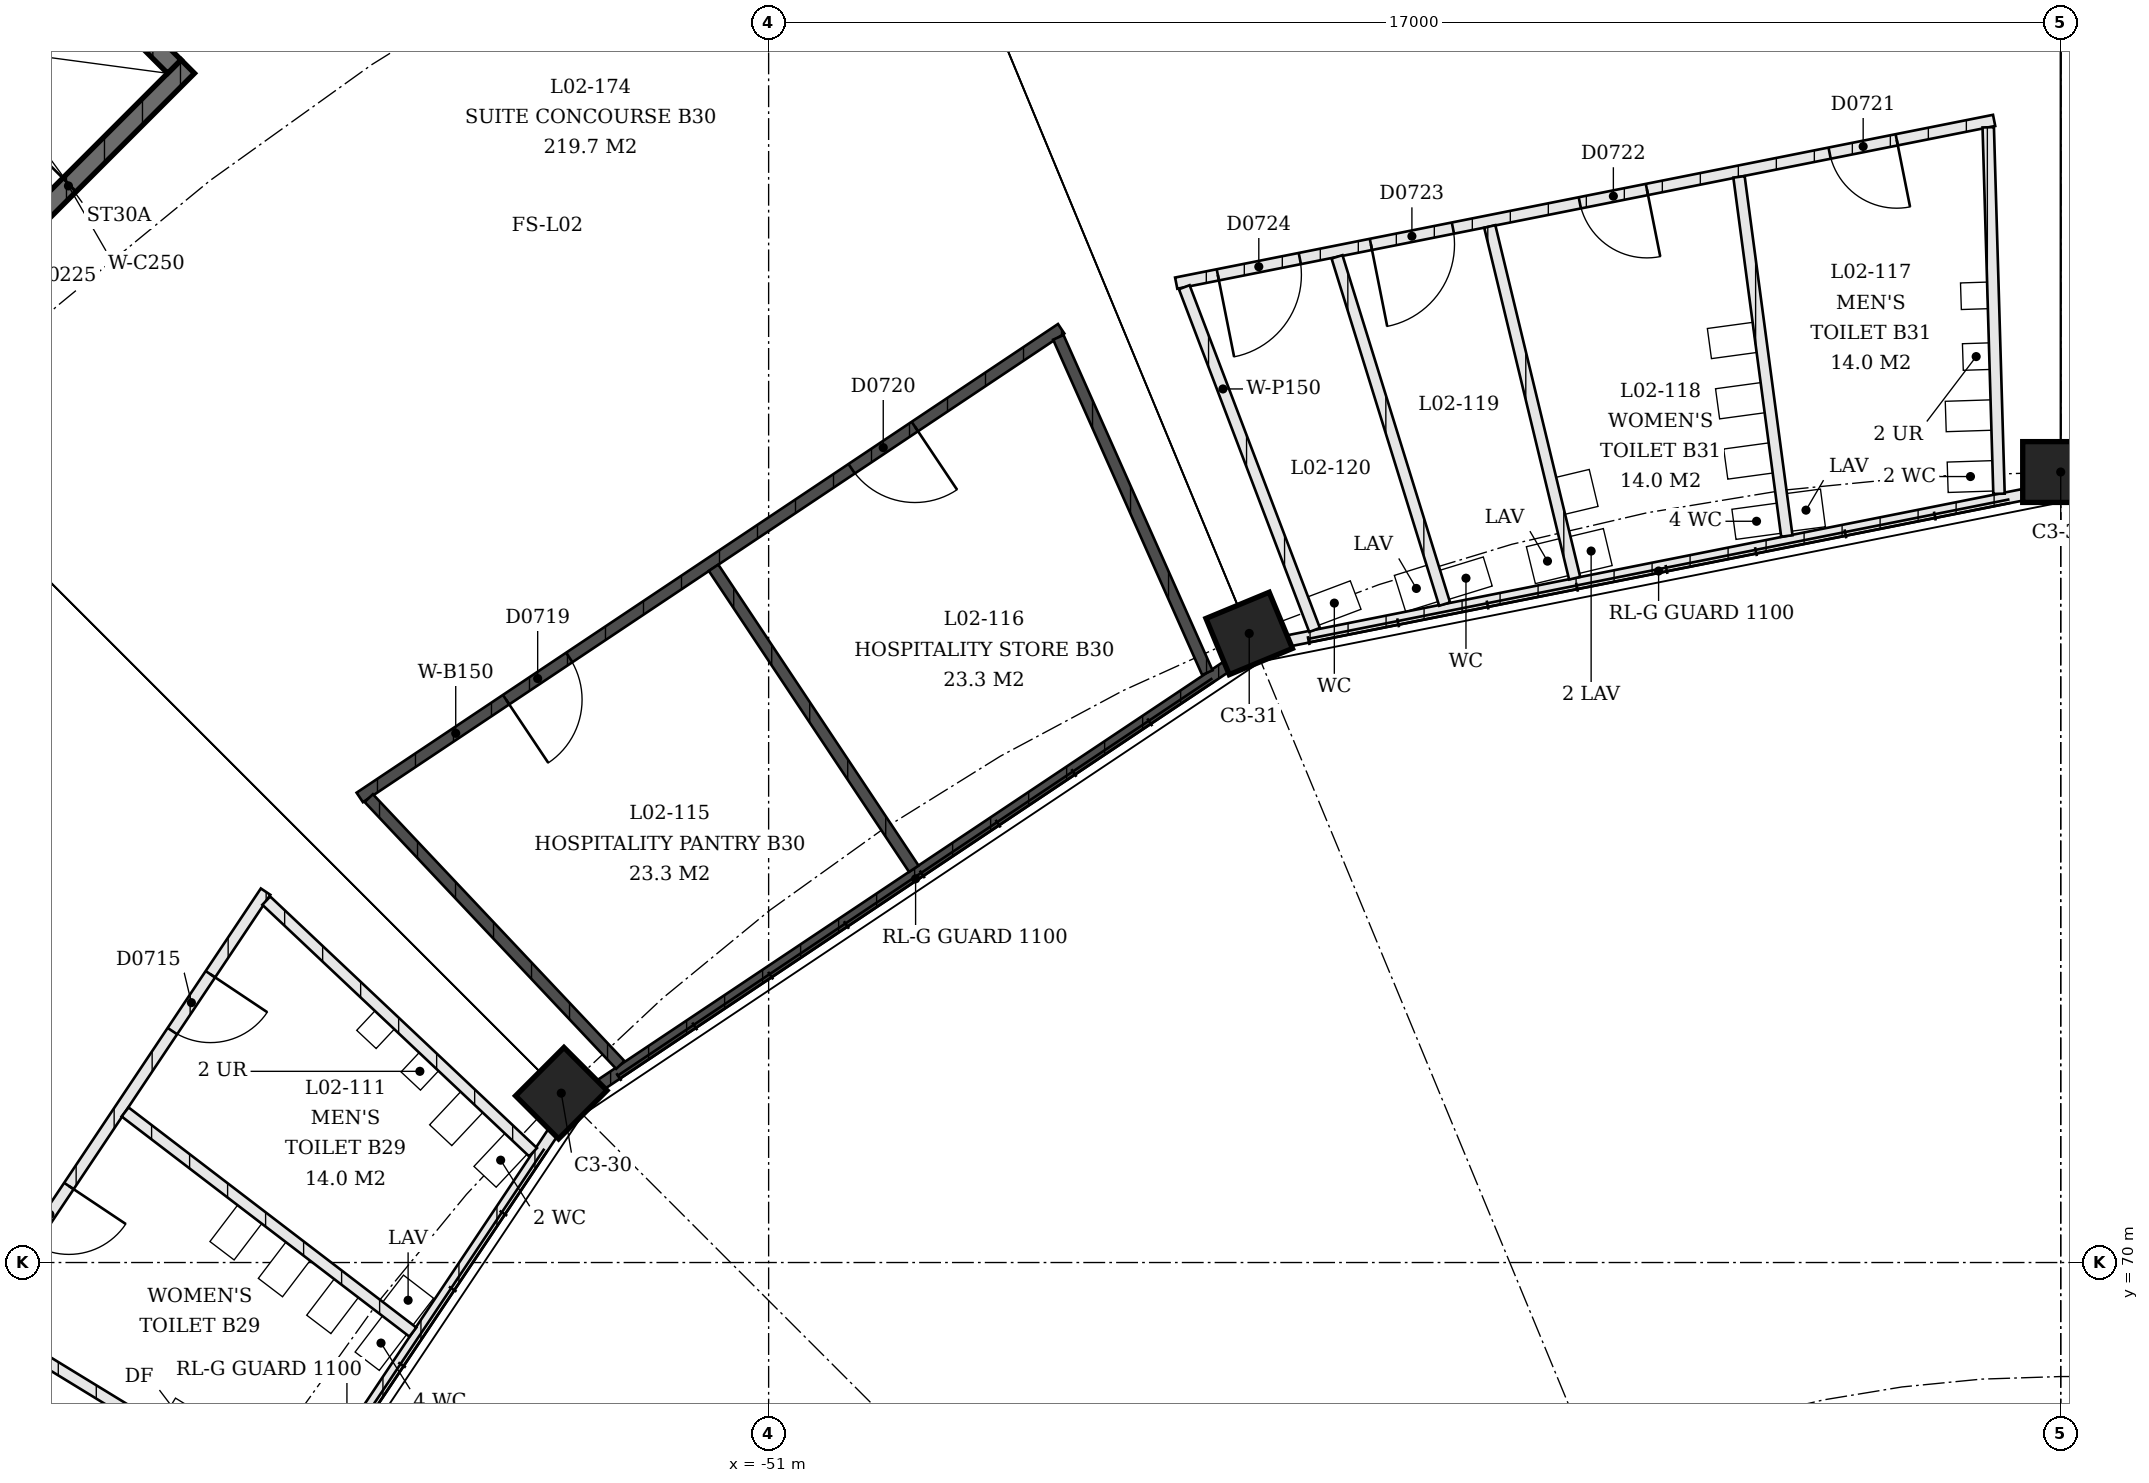
"""IFC4 building model, lengths in metres.
Left out: names, types, materials, properties, quantities, classifications, styles, units other than length and angle.
Written with IfcOpenShell. Run it as: python <this file> out.ifc"""

import sys

from ifc_helpers import new_model, si_unit, direction, frame, frame_2d, origin, origin_2d, place, context, subcontext, project, spatial, rectangle, extrude, element, fill, save


model = new_model("IFC4")
c1 = context("Model", 3, precision=1e-05, world=origin(), true_north=direction((0.0, 1.0)))
c2 = subcontext(c1, "Body", "Model", "MODEL_VIEW")
j1 = project(units=[si_unit("LENGTHUNIT", "METRE"), si_unit("PLANEANGLEUNIT", "RADIAN")], contexts=[c1])
p1 = place(None, origin())
s1 = spatial("IfcSite", under=j1, at=p1, CompositionType="ELEMENT")
p2 = place(p1, origin())
s2 = spatial("IfcBuilding", under=s1, at=p2, CompositionType="ELEMENT")
p3 = place(p2, frame((0.0, 0.0, 9.0)))
s3 = spatial("IfcBuildingStorey", under=s2, at=p3, CompositionType="ELEMENT", Elevation=9.0)
for number, where, z_axis, x_axis in (
    (1, (-53.728, 72.228, 0.0), (0.0, 0.0, 1.0), (-0.707, -0.707, 0.0)),
    (2, (-44.677, 78.276, 0.0), (0.0, 0.0, 1.0), (-0.924, -0.383, 0.0)),
):
    element("IfcColumn", number, at=place(p3, frame(where, z_axis=z_axis, x_axis=x_axis)), inside=s3, PredefinedType="COLUMN", context=c2, shape_type="SweptSolid", body=[
        extrude(rectangle(XDim=0.9, YDim=0.8, at=origin_2d()), origin(), (0.0, 0.0, 1.0), 4.5),
    ])
p4 = place(p3, frame((-34.0, 80.4, 0.0), z_axis=(0.0, 0.0, 1.0), x_axis=(-1.0, 0.0, 0.0)))
e3 = element("IfcColumn", 3, at=p4, inside=s3, PredefinedType="COLUMN", context=c2, shape_type="SweptSolid", body=[
    extrude(rectangle(XDim=1.0, YDim=0.8, at=origin_2d()), origin(), (0.0, 0.0, 1.0), 4.5),
])
p5 = place(p3, frame((-58.643, 85.734, 0.0), z_axis=(0.0, 0.0, 1.0), x_axis=(-0.707106781187, -0.707106781187, 0.0)))
e4 = element("IfcWall", 4, at=p5, inside=s3, PredefinedType="SHEAR", context=c2, shape_type="SweptSolid", body=[
    extrude(rectangle(XDim=12.15, YDim=0.25, at=frame_2d((6.075, 0.0))), origin(), (0.0, 0.0, 1.0), 4.09),
])
p6 = place(p5, frame((2.2, 0.0, 0.0)))
e5 = element("IfcOpeningElement", 5, at=p6, cuts=e4, PredefinedType="OPENING", context=c2, shape_type="SweptSolid", body=[
    extrude(rectangle(XDim=1.8, YDim=2.1, at=frame_2d((0.9, 1.05))), frame((0.0, 0.125, 0.0), z_axis=(0.0, -1.0, 0.0), x_axis=(1.0, 0.0, 0.0)), (0.0, 0.0, 1.0), 0.25),
])
p7 = place(p5, frame((8.15, 0.0, 0.0)))
e6 = element("IfcOpeningElement", 6, at=p7, cuts=e4, PredefinedType="OPENING", context=c2, shape_type="SweptSolid", body=[
    extrude(rectangle(XDim=1.8, YDim=2.1, at=frame_2d((0.9, 1.05))), frame((0.0, 0.125, 0.0), z_axis=(0.0, -1.0, 0.0), x_axis=(1.0, 0.0, 0.0)), (0.0, 0.0, 1.0), 0.25),
])
p8 = place(p3, frame((-58.819, 85.734, 0.0), z_axis=(0.0, 0.0, 1.0), x_axis=(-0.707123144286, 0.707090417709, 0.0)))
e7 = element("IfcWall", 7, at=p8, inside=s3, PredefinedType="SHEAR", context=c2, shape_type="SweptSolid", body=[
    extrude(rectangle(XDim=7.46, YDim=0.25, at=frame_2d((3.73, 0.0))), origin(), (0.0, 0.0, 1.0), 4.09),
])
p9 = place(p3, frame((-53.842, 71.705, 0.0), z_axis=(0.0, 0.0, 1.0), x_axis=(-0.555582843463, -0.831461186136, 0.0)))
e8 = element("IfcWall", 8, at=p9, inside=s3, PredefinedType="PARTITIONING", context=c2, shape_type="SweptSolid", body=[
    extrude(rectangle(XDim=9.89, YDim=0.15, at=frame_2d((4.945, 0.0))), origin(), (0.0, 0.0, 1.0), 3.0),
])
p10 = place(p3, frame((-57.619, 74.88, 0.0), z_axis=(0.0, 0.0, 1.0), x_axis=(-0.555577934543, -0.831464466258, 0.0)))
e9 = element("IfcWall", 9, at=p10, inside=s3, PredefinedType="PARTITIONING", context=c2, shape_type="SweptSolid", body=[
    extrude(rectangle(XDim=10.972, YDim=0.15, at=frame_2d((5.486, 0.0))), origin(), (0.0, 0.0, 1.0), 3.0),
])
p11 = place(p10, frame((1.307, 0.0, 0.0)))
e10 = element("IfcOpeningElement", 10, at=p11, cuts=e9, PredefinedType="OPENING", context=c2, shape_type="SweptSolid", body=[
    extrude(rectangle(XDim=0.9, YDim=2.1, at=frame_2d((0.45, 1.05))), frame((0.0, 0.075, 0.0), z_axis=(0.0, -1.0, 0.0), x_axis=(1.0, 0.0, 0.0)), (0.0, 0.0, 1.0), 0.15),
])
p12 = place(p10, frame((4.658, 0.0, 0.0)))
e11 = element("IfcOpeningElement", 11, at=p12, cuts=e9, PredefinedType="OPENING", context=c2, shape_type="SweptSolid", body=[
    extrude(rectangle(XDim=0.9, YDim=2.1, at=frame_2d((0.45, 1.05))), frame((0.0, 0.075, 0.0), z_axis=(0.0, -1.0, 0.0), x_axis=(1.0, 0.0, 0.0)), (0.0, 0.0, 1.0), 0.15),
])
p13 = place(p10, frame((7.26, 0.0, 0.0)))
e12 = element("IfcOpeningElement", 12, at=p13, cuts=e9, PredefinedType="OPENING", context=c2, shape_type="SweptSolid", body=[
    extrude(rectangle(XDim=1.1, YDim=2.1, at=frame_2d((0.55, 1.05))), frame((0.0, 0.075, 0.0), z_axis=(0.0, -1.0, 0.0), x_axis=(1.0, 0.0, 0.0)), (0.0, 0.0, 1.0), 0.15),
])
p14 = place(p10, frame((9.314, 0.0, 0.0)))
e13 = element("IfcOpeningElement", 13, at=p14, cuts=e9, PredefinedType="OPENING", context=c2, shape_type="SweptSolid", body=[
    extrude(rectangle(XDim=1.1, YDim=2.1, at=frame_2d((0.55, 1.05))), frame((0.0, 0.075, 0.0), z_axis=(0.0, -1.0, 0.0), x_axis=(1.0, 0.0, 0.0)), (0.0, 0.0, 1.0), 0.15),
])
p15 = place(p3, frame((-54.1, 71.452, 0.0), z_axis=(0.0, 0.0, 1.0), x_axis=(-0.727577136184, 0.686025882093, 0.0)))
e14 = element("IfcWall", 14, at=p15, inside=s3, PredefinedType="PARTITIONING", context=c2, shape_type="SweptSolid", body=[
    extrude(rectangle(XDim=4.824, YDim=0.15, at=frame_2d((2.412, 0.0))), origin(), (0.0, 0.0, 1.0), 3.0),
])
p16 = place(p3, frame((-55.681, 69.085, 0.0), z_axis=(0.0, 0.0, 1.0), x_axis=(-0.794266232117, 0.607569874597, 0.0)))
e15 = element("IfcWall", 15, at=p16, inside=s3, PredefinedType="PARTITIONING", context=c2, shape_type="SweptSolid", body=[
    extrude(rectangle(XDim=4.767, YDim=0.15, at=frame_2d((2.383, 0.0))), origin(), (0.0, 0.0, 1.0), 3.0),
])
p17 = place(p3, frame((-57.262, 66.718, 0.0), z_axis=(0.0, 0.0, 1.0), x_axis=(-0.8532285882, 0.52153712838, 0.0)))
e16 = element("IfcWall", 16, at=p17, inside=s3, PredefinedType="PARTITIONING", context=c2, shape_type="SweptSolid", body=[
    extrude(rectangle(XDim=4.761, YDim=0.15, at=frame_2d((2.38, 0.0))), origin(), (0.0, 0.0, 1.0), 3.0),
])
p18 = place(p3, frame((-53.205, 72.342, 0.0), z_axis=(0.0, 0.0, 1.0), x_axis=(0.831461186136, 0.555582843463, 0.0)))
e17 = element("IfcWall", 17, at=p18, inside=s3, PredefinedType="SOLIDWALL", context=c2, shape_type="SweptSolid", body=[
    extrude(rectangle(XDim=9.89, YDim=0.15, at=frame_2d((4.945, 0.0))), origin(), (0.0, 0.0, 1.0), 3.0),
])
p19 = place(p3, frame((-56.38, 76.119, 0.0), z_axis=(0.0, 0.0, 1.0), x_axis=(0.831471162003, 0.555567913722, 0.0)))
e18 = element("IfcWall", 18, at=p19, inside=s3, PredefinedType="SOLIDWALL", context=c2, shape_type="SweptSolid", body=[
    extrude(rectangle(XDim=11.099, YDim=0.15, at=frame_2d((5.55, 0.0))), origin(), (0.0, 0.0, 1.0), 3.0),
])
p20 = place(p19, frame((2.315, 0.0, 0.0)))
e19 = element("IfcOpeningElement", 19, at=p20, cuts=e18, PredefinedType="OPENING", context=c2, shape_type="SweptSolid", body=[
    extrude(rectangle(XDim=1.0, YDim=2.1, at=frame_2d((0.5, 1.05))), frame((0.0, 0.075, 0.0), z_axis=(0.0, -1.0, 0.0), x_axis=(1.0, 0.0, 0.0)), (0.0, 0.0, 1.0), 0.15),
])
p21 = place(p19, frame((7.784, 0.0, 0.0)))
e20 = element("IfcOpeningElement", 20, at=p21, cuts=e18, PredefinedType="OPENING", context=c2, shape_type="SweptSolid", body=[
    extrude(rectangle(XDim=1.0, YDim=2.1, at=frame_2d((0.5, 1.05))), frame((0.0, 0.075, 0.0), z_axis=(0.0, -1.0, 0.0), x_axis=(1.0, 0.0, 0.0)), (0.0, 0.0, 1.0), 0.15),
])
p22 = place(p3, frame((-52.952, 72.6, 0.0), z_axis=(0.0, 0.0, 1.0), x_axis=(-0.686025882093, 0.727577136184, 0.0)))
e21 = element("IfcWall", 21, at=p22, inside=s3, PredefinedType="SOLIDWALL", context=c2, shape_type="SweptSolid", body=[
    extrude(rectangle(XDim=4.824, YDim=0.15, at=frame_2d((2.412, 0.0))), origin(), (0.0, 0.0, 1.0), 3.0),
])
p23 = place(p3, frame((-49.09, 75.18, 0.0), z_axis=(0.0, 0.0, 1.0), x_axis=(-0.553930112441, 0.832563169093, 0.0)))
e22 = element("IfcWall", 22, at=p23, inside=s3, PredefinedType="SOLIDWALL", context=c2, shape_type="SweptSolid", body=[
    extrude(rectangle(XDim=4.757, YDim=0.15, at=frame_2d((2.378, 0.0))), origin(), (0.0, 0.0, 1.0), 3.0),
])
p24 = place(p3, frame((-45.228, 77.761, 0.0), z_axis=(0.0, 0.0, 1.0), x_axis=(-0.406147851791, 0.913807377124, 0.0)))
e23 = element("IfcWall", 23, at=p24, inside=s3, PredefinedType="SOLIDWALL", context=c2, shape_type="SweptSolid", body=[
    extrude(rectangle(XDim=4.827, YDim=0.15, at=frame_2d((2.414, 0.0))), origin(), (0.0, 0.0, 1.0), 3.0),
])
p25 = place(p3, frame((-34.5, 80.101, 0.0), z_axis=(0.0, 0.0, 1.0), x_axis=(-0.980783419557, -0.195099676887, 0.0)))
e24 = element("IfcWall", 24, at=p25, inside=s3, PredefinedType="PARTITIONING", context=c2, shape_type="SweptSolid", body=[
    extrude(rectangle(XDim=9.839, YDim=0.15, at=frame_2d((4.92, 0.0))), origin(), (0.0, 0.0, 1.0), 3.0),
])
p26 = place(p3, frame((-34.876, 85.026, 0.0), z_axis=(0.0, 0.0, 1.0), x_axis=(-0.980788934186, -0.195071952313, 0.0)))
e25 = element("IfcWall", 25, at=p26, inside=s3, PredefinedType="PARTITIONING", context=c2, shape_type="SweptSolid", body=[
    extrude(rectangle(XDim=10.972, YDim=0.15, at=frame_2d((5.486, 0.0))), origin(), (0.0, 0.0, 1.0), 3.0),
])
p27 = place(p26, frame((1.307, 0.0, 0.0)))
e26 = element("IfcOpeningElement", 26, at=p27, cuts=e25, PredefinedType="OPENING", context=c2, shape_type="SweptSolid", body=[
    extrude(rectangle(XDim=0.9, YDim=2.1, at=frame_2d((0.45, 1.05))), frame((0.0, 0.075, 0.0), z_axis=(0.0, -1.0, 0.0), x_axis=(1.0, 0.0, 0.0)), (0.0, 0.0, 1.0), 0.15),
])
p28 = place(p26, frame((4.658, 0.0, 0.0)))
e27 = element("IfcOpeningElement", 27, at=p28, cuts=e25, PredefinedType="OPENING", context=c2, shape_type="SweptSolid", body=[
    extrude(rectangle(XDim=0.9, YDim=2.1, at=frame_2d((0.45, 1.05))), frame((0.0, 0.075, 0.0), z_axis=(0.0, -1.0, 0.0), x_axis=(1.0, 0.0, 0.0)), (0.0, 0.0, 1.0), 0.15),
])
p29 = place(p26, frame((7.26, 0.0, 0.0)))
e28 = element("IfcOpeningElement", 28, at=p29, cuts=e25, PredefinedType="OPENING", context=c2, shape_type="SweptSolid", body=[
    extrude(rectangle(XDim=1.1, YDim=2.1, at=frame_2d((0.55, 1.05))), frame((0.0, 0.075, 0.0), z_axis=(0.0, -1.0, 0.0), x_axis=(1.0, 0.0, 0.0)), (0.0, 0.0, 1.0), 0.15),
])
p30 = place(p26, frame((9.314, 0.0, 0.0)))
e29 = element("IfcOpeningElement", 29, at=p30, cuts=e25, PredefinedType="OPENING", context=c2, shape_type="SweptSolid", body=[
    extrude(rectangle(XDim=1.1, YDim=2.1, at=frame_2d((0.55, 1.05))), frame((0.0, 0.075, 0.0), z_axis=(0.0, -1.0, 0.0), x_axis=(1.0, 0.0, 0.0)), (0.0, 0.0, 1.0), 0.15),
])
p31 = place(p3, frame((-34.812, 80.114, 0.0), z_axis=(0.0, 0.0, 1.0), x_axis=(-0.029405000692, 0.999567579473, 0.0)))
e30 = element("IfcWall", 30, at=p31, inside=s3, PredefinedType="PARTITIONING", context=c2, shape_type="SweptSolid", body=[
    extrude(rectangle(XDim=4.824, YDim=0.15, at=frame_2d((2.412, 0.0))), origin(), (0.0, 0.0, 1.0), 3.0),
])
p32 = place(p3, frame((-37.604, 79.558, 0.0), z_axis=(0.0, 0.0, 1.0), x_axis=(-0.131992613728, 0.991250699834, 0.0)))
e31 = element("IfcWall", 31, at=p32, inside=s3, PredefinedType="PARTITIONING", context=c2, shape_type="SweptSolid", body=[
    extrude(rectangle(XDim=4.767, YDim=0.15, at=frame_2d((2.383, 0.0))), origin(), (0.0, 0.0, 1.0), 3.0),
])
p33 = place(p3, frame((-40.395, 79.003, 0.0), z_axis=(0.0, 0.0, 1.0), x_axis=(-0.234563667056, 0.972100759231, 0.0)))
e32 = element("IfcWall", 32, at=p33, inside=s3, PredefinedType="PARTITIONING", context=c2, shape_type="SweptSolid", body=[
    extrude(rectangle(XDim=4.761, YDim=0.15, at=frame_2d((2.38, 0.0))), origin(), (0.0, 0.0, 1.0), 3.0),
])
p34 = place(p3, frame((-42.106, 78.663, 0.0), z_axis=(0.0, 0.0, 1.0), x_axis=(-0.295972093403, 0.955196587058, 0.0)))
e33 = element("IfcWall", 33, at=p34, inside=s3, PredefinedType="PARTITIONING", context=c2, shape_type="SweptSolid", body=[
    extrude(rectangle(XDim=4.783, YDim=0.15, at=frame_2d((2.391, 0.0))), origin(), (0.0, 0.0, 1.0), 3.0),
])
p35 = place(p3, frame((-43.817, 78.322, 0.0), z_axis=(0.0, 0.0, 1.0), x_axis=(-0.35538492255, 0.934720041951, 0.0)))
e34 = element("IfcWall", 34, at=p35, inside=s3, PredefinedType="PARTITIONING", context=c2, shape_type="SweptSolid", body=[
    extrude(rectangle(XDim=4.824, YDim=0.15, at=frame_2d((2.412, 0.0))), origin(), (0.0, 0.0, 1.0), 3.0),
])
p36 = place(p6, origin())
e35 = element("IfcDoor", 35, at=p36, inside=s3, OperationType="DOUBLE_DOOR_SINGLE_SWING", PredefinedType="DOOR", context=c2, shape_type="SweptSolid", body=[
    extrude(rectangle(XDim=1.8, YDim=2.1, at=frame_2d((0.9, 1.05))), frame((0.0, 0.025, 0.0), z_axis=(0.0, -1.0, 0.0), x_axis=(1.0, 0.0, 0.0)), (0.0, 0.0, 1.0), 0.05),
])
fill(e5, e35)
p37 = place(p11, origin())
e36 = element("IfcDoor", 36, at=p37, inside=s3, OperationType="SINGLE_SWING_RIGHT", PredefinedType="DOOR", context=c2, shape_type="SweptSolid", body=[
    extrude(rectangle(XDim=0.9, YDim=2.1, at=frame_2d((0.45, 1.05))), frame((0.0, 0.025, 0.0), z_axis=(0.0, -1.0, 0.0), x_axis=(1.0, 0.0, 0.0)), (0.0, 0.0, 1.0), 0.05),
])
fill(e10, e36)
p38 = place(p12, origin())
e37 = element("IfcDoor", 37, at=p38, inside=s3, OperationType="SINGLE_SWING_RIGHT", PredefinedType="DOOR", context=c2, shape_type="SweptSolid", body=[
    extrude(rectangle(XDim=0.9, YDim=2.1, at=frame_2d((0.45, 1.05))), frame((0.0, 0.025, 0.0), z_axis=(0.0, -1.0, 0.0), x_axis=(1.0, 0.0, 0.0)), (0.0, 0.0, 1.0), 0.05),
])
fill(e11, e37)
p39 = place(p20, origin())
e38 = element("IfcDoor", 38, at=p39, inside=s3, OperationType="SINGLE_SWING_LEFT", PredefinedType="DOOR", context=c2, shape_type="SweptSolid", body=[
    extrude(rectangle(XDim=1.0, YDim=2.1, at=frame_2d((0.5, 1.05))), frame((0.0, 0.025, 0.0), z_axis=(0.0, -1.0, 0.0), x_axis=(1.0, 0.0, 0.0)), (0.0, 0.0, 1.0), 0.05),
])
fill(e19, e38)
p40 = place(p21, origin())
e39 = element("IfcDoor", 39, at=p40, inside=s3, OperationType="SINGLE_SWING_RIGHT", PredefinedType="DOOR", context=c2, shape_type="SweptSolid", body=[
    extrude(rectangle(XDim=1.0, YDim=2.1, at=frame_2d((0.5, 1.05))), frame((0.0, 0.025, 0.0), z_axis=(0.0, -1.0, 0.0), x_axis=(1.0, 0.0, 0.0)), (0.0, 0.0, 1.0), 0.05),
])
fill(e20, e39)
p41 = place(p27, origin())
e40 = element("IfcDoor", 40, at=p41, inside=s3, OperationType="SINGLE_SWING_RIGHT", PredefinedType="DOOR", context=c2, shape_type="SweptSolid", body=[
    extrude(rectangle(XDim=0.9, YDim=2.1, at=frame_2d((0.45, 1.05))), frame((0.0, 0.025, 0.0), z_axis=(0.0, -1.0, 0.0), x_axis=(1.0, 0.0, 0.0)), (0.0, 0.0, 1.0), 0.05),
])
fill(e26, e40)
p42 = place(p28, origin())
e41 = element("IfcDoor", 41, at=p42, inside=s3, OperationType="SINGLE_SWING_RIGHT", PredefinedType="DOOR", context=c2, shape_type="SweptSolid", body=[
    extrude(rectangle(XDim=0.9, YDim=2.1, at=frame_2d((0.45, 1.05))), frame((0.0, 0.025, 0.0), z_axis=(0.0, -1.0, 0.0), x_axis=(1.0, 0.0, 0.0)), (0.0, 0.0, 1.0), 0.05),
])
fill(e27, e41)
p43 = place(p29, origin())
e42 = element("IfcDoor", 42, at=p43, inside=s3, OperationType="SINGLE_SWING_LEFT", PredefinedType="DOOR", context=c2, shape_type="SweptSolid", body=[
    extrude(rectangle(XDim=1.1, YDim=2.1, at=frame_2d((0.55, 1.05))), frame((0.0, 0.025, 0.0), z_axis=(0.0, -1.0, 0.0), x_axis=(1.0, 0.0, 0.0)), (0.0, 0.0, 1.0), 0.05),
])
fill(e28, e42)
p44 = place(p30, origin())
e43 = element("IfcDoor", 43, at=p44, inside=s3, OperationType="SINGLE_SWING_LEFT", PredefinedType="DOOR", context=c2, shape_type="SweptSolid", body=[
    extrude(rectangle(XDim=1.1, YDim=2.1, at=frame_2d((0.55, 1.05))), frame((0.0, 0.025, 0.0), z_axis=(0.0, -1.0, 0.0), x_axis=(1.0, 0.0, 0.0)), (0.0, 0.0, 1.0), 0.05),
])
fill(e29, e43)
save(model, sys.argv[1])
